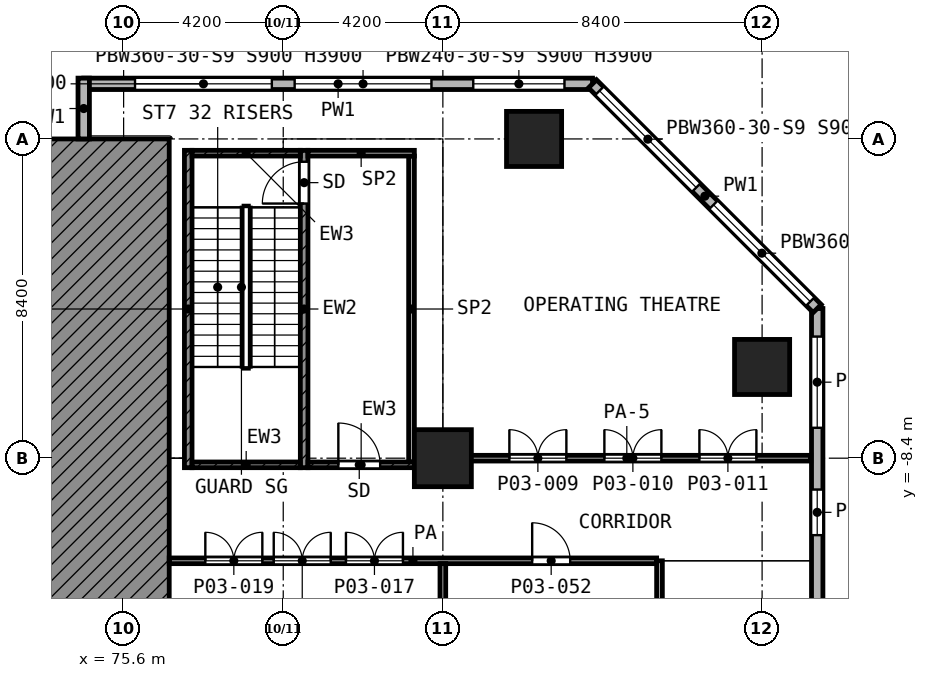
"""IFC4 building model, lengths in metres.
Left out: names, types, materials, properties, quantities, classifications, styles, units other than length and angle.
Written with IfcOpenShell. Run it as: python <this file> out.ifc"""

import sys

from ifc_helpers import new_model, si_unit, direction, frame, frame_2d, origin, origin_2d, place, context, subcontext, project, spatial, polyline, rectangle, outline, extrude, element, fill, save


model = new_model("IFC4")
c1 = context("Model", 3, precision=1e-05, world=origin(), true_north=direction((0.0, 1.0)))
c2 = subcontext(c1, "Body", "Model", "MODEL_VIEW")
j1 = project(units=[si_unit("LENGTHUNIT", "METRE"), si_unit("PLANEANGLEUNIT", "RADIAN")], contexts=[c1])
p1 = place(None, origin())
s1 = spatial("IfcSite", under=j1, at=p1, CompositionType="ELEMENT")
p2 = place(p1, origin())
s2 = spatial("IfcBuilding", under=s1, at=p2, CompositionType="ELEMENT")
p3 = place(p2, frame((0.0, 0.0, 12.6)))
s3 = spatial("IfcBuildingStorey", under=s2, at=p3, CompositionType="ELEMENT", Elevation=12.6)
for number, where, z_axis, x_axis in (
    (1, (86.4, 0.0, 0.0), (0.0, 0.0, 1.0), (1.0, 0.0, 0.0)),
    (2, (92.4, -6.0, 0.0), (0.0, 0.0, 1.0), (1.0, 0.0, 0.0)),
):
    element("IfcColumn", number, at=place(p3, frame(where, z_axis=z_axis, x_axis=x_axis)), inside=s3, PredefinedType="COLUMN", context=c2, shape_type="SweptSolid", body=[
        extrude(rectangle(XDim=1.45, YDim=1.45, at=origin_2d()), origin(), (0.0, 0.0, 1.0), 5.6),
    ])
p4 = place(p3, frame((84.0, -8.4, 0.0), z_axis=(0.0, 0.0, 1.0), x_axis=(1.0, 0.0, 0.0)))
e3 = element("IfcColumn", 3, at=p4, inside=s3, PredefinedType="COLUMN", context=c2, shape_type="SweptSolid", body=[
    extrude(rectangle(XDim=1.5, YDim=1.5, at=origin_2d()), origin(), (0.0, 0.0, 1.0), 5.6),
])
p5 = place(p3, frame((0.0, 0.0, -12.6), z_axis=(0.0, -1.0, 0.0), x_axis=(1.0, 0.0, 0.0)))
e4 = element("IfcWall", 4, at=p5, inside=s3, PredefinedType="SHEAR", context=c2, shape_type="SweptSolid", body=[
    extrude(outline(polyline([(73.952, 12.6), (73.766, 13.468), (72.986, 15.591), (71.916, 17.583), (71.462, 18.2), (76.8, 18.2), (76.8, 12.6), (73.952, 12.6)])), origin(), (0.0, 0.0, 1.0), 33.6),
])
p6 = place(p3, frame((93.85, -29.138, 0.0), z_axis=(0.0, 0.0, 1.0), x_axis=(0.0, 1.0, 0.0)))
e5 = element("IfcWall", 5, at=p6, inside=s3, PredefinedType="SOLIDWALL", context=c2, shape_type="SweptSolid", body=[
    extrude(rectangle(XDim=24.676, YDim=0.3, at=frame_2d((12.338, 0.0))), origin(), (0.0, 0.0, 1.0), 5.25),
])
p7 = place(p6, frame((0.738, 0.0, 0.9)))
e6 = element("IfcOpeningElement", 6, at=p7, cuts=e5, PredefinedType="OPENING", context=c2, shape_type="SweptSolid", body=[
    extrude(rectangle(XDim=2.4, YDim=3.0, at=frame_2d((1.2, 1.5))), frame((0.0, 0.16, 0.0), z_axis=(0.0, -1.0, 0.0), x_axis=(1.0, 0.0, 0.0)), (0.0, 0.0, 1.0), 0.32),
])
p8 = place(p6, frame((4.763, 0.0, 0.9)))
e7 = element("IfcOpeningElement", 7, at=p8, cuts=e5, PredefinedType="OPENING", context=c2, shape_type="SweptSolid", body=[
    extrude(rectangle(XDim=1.2, YDim=3.0, at=frame_2d((0.6, 1.5))), frame((0.0, 0.16, 0.0), z_axis=(0.0, -1.0, 0.0), x_axis=(1.0, 0.0, 0.0)), (0.0, 0.0, 1.0), 0.32),
])
p9 = place(p6, frame((8.438, 0.0, 0.9)))
e8 = element("IfcOpeningElement", 8, at=p9, cuts=e5, PredefinedType="OPENING", context=c2, shape_type="SweptSolid", body=[
    extrude(rectangle(XDim=3.6, YDim=3.0, at=frame_2d((1.8, 1.5))), frame((0.0, 0.16, 0.0), z_axis=(0.0, -1.0, 0.0), x_axis=(1.0, 0.0, 0.0)), (0.0, 0.0, 1.0), 0.32),
])
p10 = place(p6, frame((12.638, 0.0, 0.9)))
e9 = element("IfcOpeningElement", 9, at=p10, cuts=e5, PredefinedType="OPENING", context=c2, shape_type="SweptSolid", body=[
    extrude(rectangle(XDim=3.6, YDim=3.0, at=frame_2d((1.8, 1.5))), frame((0.0, 0.16, 0.0), z_axis=(0.0, -1.0, 0.0), x_axis=(1.0, 0.0, 0.0)), (0.0, 0.0, 1.0), 0.32),
])
p11 = place(p6, frame((18.713, 0.0, 0.9)))
e10 = element("IfcOpeningElement", 10, at=p11, cuts=e5, PredefinedType="OPENING", context=c2, shape_type="SweptSolid", body=[
    extrude(rectangle(XDim=1.2, YDim=3.0, at=frame_2d((0.6, 1.5))), frame((0.0, 0.16, 0.0), z_axis=(0.0, -1.0, 0.0), x_axis=(1.0, 0.0, 0.0)), (0.0, 0.0, 1.0), 0.32),
])
p12 = place(p6, frame((21.538, 0.0, 0.9)))
e11 = element("IfcOpeningElement", 11, at=p12, cuts=e5, PredefinedType="OPENING", context=c2, shape_type="SweptSolid", body=[
    extrude(rectangle(XDim=2.4, YDim=3.0, at=frame_2d((1.2, 1.5))), frame((0.0, 0.16, 0.0), z_axis=(0.0, -1.0, 0.0), x_axis=(1.0, 0.0, 0.0)), (0.0, 0.0, 1.0), 0.32),
])
p13 = place(p3, frame((93.85, -4.462, 0.0), z_axis=(0.0, 0.0, 1.0), x_axis=(-0.707106781187, 0.707106781187, 0.0)))
e12 = element("IfcWall", 12, at=p13, inside=s3, PredefinedType="SOLIDWALL", context=c2, shape_type="SweptSolid", body=[
    extrude(rectangle(XDim=8.361, YDim=0.3, at=frame_2d((4.181, 0.0))), origin(), (0.0, 0.0, 1.0), 5.25),
])
p14 = place(p13, frame((0.259, 0.0, 0.9)))
e13 = element("IfcOpeningElement", 13, at=p14, cuts=e12, PredefinedType="OPENING", context=c2, shape_type="SweptSolid", body=[
    extrude(rectangle(XDim=3.6, YDim=3.0, at=frame_2d((1.8, 1.5))), frame((0.0, 0.16, 0.0), z_axis=(0.0, -1.0, 0.0), x_axis=(1.0, 0.0, 0.0)), (0.0, 0.0, 1.0), 0.32),
])
p15 = place(p13, frame((4.502, 0.0, 0.9)))
e14 = element("IfcOpeningElement", 14, at=p15, cuts=e12, PredefinedType="OPENING", context=c2, shape_type="SweptSolid", body=[
    extrude(rectangle(XDim=3.6, YDim=3.0, at=frame_2d((1.8, 1.5))), frame((0.0, 0.16, 0.0), z_axis=(0.0, -1.0, 0.0), x_axis=(1.0, 0.0, 0.0)), (0.0, 0.0, 1.0), 0.32),
])
p16 = place(p3, frame((87.938, 1.45, 0.0), z_axis=(0.0, 0.0, 1.0), x_axis=(-1.0, 0.0, 0.0)))
e15 = element("IfcWall", 15, at=p16, inside=s3, PredefinedType="SOLIDWALL", context=c2, shape_type="SweptSolid", body=[
    extrude(rectangle(XDim=13.388, YDim=0.3, at=frame_2d((6.694, 0.0))), origin(), (0.0, 0.0, 1.0), 5.25),
])
p17 = place(p16, frame((0.738, 0.0, 0.9)))
e16 = element("IfcOpeningElement", 16, at=p17, cuts=e15, PredefinedType="OPENING", context=c2, shape_type="SweptSolid", body=[
    extrude(rectangle(XDim=2.4, YDim=3.0, at=frame_2d((1.2, 1.5))), frame((0.0, 0.16, 0.0), z_axis=(0.0, -1.0, 0.0), x_axis=(1.0, 0.0, 0.0)), (0.0, 0.0, 1.0), 0.32),
])
p18 = place(p16, frame((4.238, 0.0, 0.9)))
e17 = element("IfcOpeningElement", 17, at=p18, cuts=e15, PredefinedType="OPENING", context=c2, shape_type="SweptSolid", body=[
    extrude(rectangle(XDim=3.6, YDim=3.0, at=frame_2d((1.8, 1.5))), frame((0.0, 0.16, 0.0), z_axis=(0.0, -1.0, 0.0), x_axis=(1.0, 0.0, 0.0)), (0.0, 0.0, 1.0), 0.32),
])
p19 = place(p16, frame((8.438, 0.0, 0.9)))
e18 = element("IfcOpeningElement", 18, at=p19, cuts=e15, PredefinedType="OPENING", context=c2, shape_type="SweptSolid", body=[
    extrude(rectangle(XDim=3.6, YDim=3.0, at=frame_2d((1.8, 1.5))), frame((0.0, 0.16, 0.0), z_axis=(0.0, -1.0, 0.0), x_axis=(1.0, 0.0, 0.0)), (0.0, 0.0, 1.0), 0.32),
])
p20 = place(p3, frame((74.55, 1.6, 0.0), z_axis=(0.0, 0.0, 1.0), x_axis=(0.0, -1.0, 0.0)))
e19 = element("IfcWall", 19, at=p20, inside=s3, PredefinedType="SOLIDWALL", context=c2, shape_type="SweptSolid", body=[
    extrude(rectangle(XDim=1.6, YDim=0.3, at=frame_2d((0.8, 0.0))), origin(), (0.0, 0.0, 1.0), 5.25),
])
p21 = place(p3, frame((77.3, -8.65, 0.0), z_axis=(0.0, 0.0, 1.0), x_axis=(0.0, 1.0, 0.0)))
e20 = element("IfcWall", 20, at=p21, inside=s3, PredefinedType="SHEAR", context=c2, shape_type="SweptSolid", body=[
    extrude(rectangle(XDim=8.35, YDim=0.2, at=frame_2d((4.175, 0.0))), origin(), (0.0, 0.0, 1.0), 5.25),
])
p22 = place(p3, frame((80.35, -8.65, 0.0), z_axis=(0.0, 0.0, 1.0), x_axis=(0.0, 1.0, 0.0)))
e21 = element("IfcWall", 21, at=p22, inside=s3, PredefinedType="SHEAR", context=c2, shape_type="SweptSolid", body=[
    extrude(rectangle(XDim=8.35, YDim=0.2, at=frame_2d((4.175, 0.0))), origin(), (0.0, 0.0, 1.0), 5.25),
])
p23 = place(p22, frame((6.95, 0.0, 0.0)))
e22 = element("IfcOpeningElement", 22, at=p23, cuts=e21, PredefinedType="OPENING", context=c2, shape_type="SweptSolid", body=[
    extrude(rectangle(XDim=1.1, YDim=2.1, at=frame_2d((0.55, 1.05))), frame((0.0, 0.11, 0.0), z_axis=(0.0, -1.0, 0.0), x_axis=(1.0, 0.0, 0.0)), (0.0, 0.0, 1.0), 0.22),
])
p24 = place(p3, frame((77.4, -0.375, 0.0), z_axis=(0.0, 0.0, 1.0), x_axis=(1.0, 0.0, 0.0)))
e23 = element("IfcWall", 23, at=p24, inside=s3, PredefinedType="SHEAR", context=c2, shape_type="SweptSolid", body=[
    extrude(rectangle(XDim=2.85, YDim=0.15, at=frame_2d((1.425, 0.0))), origin(), (0.0, 0.0, 1.0), 5.25),
])
p25 = place(p3, frame((80.45, -0.375, 0.0), z_axis=(0.0, 0.0, 1.0), x_axis=(1.0, 0.0, 0.0)))
e24 = element("IfcWall", 24, at=p25, inside=s3, PredefinedType="PARTITIONING", context=c2, shape_type="SweptSolid", body=[
    extrude(rectangle(XDim=2.8, YDim=0.15, at=frame_2d((1.4, 0.0))), origin(), (0.0, 0.0, 1.0), 5.25),
])
p26 = place(p3, frame((77.4, -8.575, 0.0), z_axis=(0.0, 0.0, 1.0), x_axis=(1.0, 0.0, 0.0)))
e25 = element("IfcWall", 25, at=p26, inside=s3, PredefinedType="SHEAR", context=c2, shape_type="SweptSolid", body=[
    extrude(rectangle(XDim=2.85, YDim=0.15, at=frame_2d((1.425, 0.0))), origin(), (0.0, 0.0, 1.0), 5.25),
])
p27 = place(p3, frame((80.45, -8.575, 0.0), z_axis=(0.0, 0.0, 1.0), x_axis=(1.0, 0.0, 0.0)))
e26 = element("IfcWall", 26, at=p27, inside=s3, PredefinedType="SHEAR", context=c2, shape_type="SweptSolid", body=[
    extrude(rectangle(XDim=2.8, YDim=0.15, at=frame_2d((1.4, 0.0))), origin(), (0.0, 0.0, 1.0), 5.25),
])
p28 = place(p27, frame((0.8, 0.0, 0.0)))
e27 = element("IfcOpeningElement", 27, at=p28, cuts=e26, PredefinedType="OPENING", context=c2, shape_type="SweptSolid", body=[
    extrude(rectangle(XDim=1.1, YDim=2.1, at=frame_2d((0.55, 1.05))), frame((0.0, 0.085, 0.0), z_axis=(0.0, -1.0, 0.0), x_axis=(1.0, 0.0, 0.0)), (0.0, 0.0, 1.0), 0.17),
])
p29 = place(p3, frame((83.175, -8.5, 0.0), z_axis=(0.0, 0.0, 1.0), x_axis=(0.0, 1.0, 0.0)))
e28 = element("IfcWall", 28, at=p29, inside=s3, PredefinedType="PARTITIONING", context=c2, shape_type="SweptSolid", body=[
    extrude(rectangle(XDim=8.05, YDim=0.15, at=frame_2d((4.025, 0.0))), origin(), (0.0, 0.0, 1.0), 5.25),
])
p30 = place(p3, frame((76.8, -11.1, 0.0), z_axis=(0.0, 0.0, 1.0), x_axis=(1.0, 0.0, 0.0)))
e29 = element("IfcWall", 29, at=p30, inside=s3, PredefinedType="PARTITIONING", context=c2, shape_type="SweptSolid", body=[
    extrude(rectangle(XDim=12.825, YDim=0.15, at=frame_2d((6.413, 0.0))), origin(), (0.0, 0.0, 1.0), 5.25),
])
p31 = place(p30, frame((4.65, 0.0, 0.0)))
e30 = element("IfcOpeningElement", 30, at=p31, cuts=e29, PredefinedType="OPENING", context=c2, shape_type="SweptSolid", body=[
    extrude(rectangle(XDim=1.5, YDim=2.1, at=frame_2d((0.75, 1.05))), frame((0.0, 0.085, 0.0), z_axis=(0.0, -1.0, 0.0), x_axis=(1.0, 0.0, 0.0)), (0.0, 0.0, 1.0), 0.17),
])
p32 = place(p30, frame((2.75, 0.0, 0.0)))
e31 = element("IfcOpeningElement", 31, at=p32, cuts=e29, PredefinedType="OPENING", context=c2, shape_type="SweptSolid", body=[
    extrude(rectangle(XDim=1.5, YDim=2.1, at=frame_2d((0.75, 1.05))), frame((0.0, 0.085, 0.0), z_axis=(0.0, -1.0, 0.0), x_axis=(1.0, 0.0, 0.0)), (0.0, 0.0, 1.0), 0.17),
])
p33 = place(p30, frame((0.95, 0.0, 0.0)))
e32 = element("IfcOpeningElement", 32, at=p33, cuts=e29, PredefinedType="OPENING", context=c2, shape_type="SweptSolid", body=[
    extrude(rectangle(XDim=1.5, YDim=2.1, at=frame_2d((0.75, 1.05))), frame((0.0, 0.085, 0.0), z_axis=(0.0, -1.0, 0.0), x_axis=(1.0, 0.0, 0.0)), (0.0, 0.0, 1.0), 0.17),
])
p34 = place(p30, frame((9.55, 0.0, 0.0)))
e33 = element("IfcOpeningElement", 33, at=p34, cuts=e29, PredefinedType="OPENING", context=c2, shape_type="SweptSolid", body=[
    extrude(rectangle(XDim=1.0, YDim=2.1, at=frame_2d((0.5, 1.05))), frame((0.0, 0.085, 0.0), z_axis=(0.0, -1.0, 0.0), x_axis=(1.0, 0.0, 0.0)), (0.0, 0.0, 1.0), 0.17),
])
e34 = element("IfcWall", 34, at=p4, inside=s3, PredefinedType="PARTITIONING", context=c2, shape_type="SweptSolid", body=[
    extrude(rectangle(XDim=9.68, YDim=0.15, at=frame_2d((4.84, 0.0))), origin(), (0.0, 0.0, 1.0), 3.85),
])
p35 = place(p4, frame((1.75, 0.0, 0.0)))
e35 = element("IfcOpeningElement", 35, at=p35, cuts=e34, PredefinedType="OPENING", context=c2, shape_type="SweptSolid", body=[
    extrude(rectangle(XDim=1.5, YDim=2.1, at=frame_2d((0.75, 1.05))), frame((0.0, 0.085, 0.0), z_axis=(0.0, -1.0, 0.0), x_axis=(1.0, 0.0, 0.0)), (0.0, 0.0, 1.0), 0.17),
])
p36 = place(p4, frame((4.25, 0.0, 0.0)))
e36 = element("IfcOpeningElement", 36, at=p36, cuts=e34, PredefinedType="OPENING", context=c2, shape_type="SweptSolid", body=[
    extrude(rectangle(XDim=1.5, YDim=2.1, at=frame_2d((0.75, 1.05))), frame((0.0, 0.085, 0.0), z_axis=(0.0, -1.0, 0.0), x_axis=(1.0, 0.0, 0.0)), (0.0, 0.0, 1.0), 0.17),
])
p37 = place(p4, frame((6.75, 0.0, 0.0)))
e37 = element("IfcOpeningElement", 37, at=p37, cuts=e34, PredefinedType="OPENING", context=c2, shape_type="SweptSolid", body=[
    extrude(rectangle(XDim=1.5, YDim=2.1, at=frame_2d((0.75, 1.05))), frame((0.0, 0.085, 0.0), z_axis=(0.0, -1.0, 0.0), x_axis=(1.0, 0.0, 0.0)), (0.0, 0.0, 1.0), 0.17),
])
p38 = place(p3, frame((84.0, -22.425, 0.0), z_axis=(0.0, 0.0, 1.0), x_axis=(0.0, 1.0, 0.0)))
e38 = element("IfcWall", 38, at=p38, inside=s3, PredefinedType="PARTITIONING", context=c2, shape_type="SweptSolid", body=[
    extrude(rectangle(XDim=11.25, YDim=0.15, at=frame_2d((5.625, 0.0))), origin(), (0.0, 0.0, 1.0), 5.25),
])
p39 = place(p3, frame((89.7, -22.5, 0.0), z_axis=(0.0, 0.0, 1.0), x_axis=(0.0, 1.0, 0.0)))
e39 = element("IfcWall", 39, at=p39, inside=s3, PredefinedType="PARTITIONING", context=c2, shape_type="SweptSolid", body=[
    extrude(rectangle(XDim=11.4, YDim=0.15, at=frame_2d((5.7, 0.0))), origin(), (0.0, 0.0, 1.0), 5.25),
])
p40 = place(p11, origin())
e40 = element("IfcWindow", 40, at=p40, inside=s3, PartitioningType="SINGLE_PANEL", PredefinedType="WINDOW", context=c2, shape_type="SweptSolid", body=[
    extrude(rectangle(XDim=1.2, YDim=3.0, at=frame_2d((0.6, 1.5))), frame((0.0, 0.03, 0.0), z_axis=(0.0, -1.0, 0.0), x_axis=(1.0, 0.0, 0.0)), (0.0, 0.0, 1.0), 0.06),
])
fill(e10, e40)
p41 = place(p12, origin())
e41 = element("IfcWindow", 41, at=p41, inside=s3, PartitioningType="SINGLE_PANEL", PredefinedType="WINDOW", context=c2, shape_type="SweptSolid", body=[
    extrude(rectangle(XDim=2.4, YDim=3.0, at=frame_2d((1.2, 1.5))), frame((0.0, 0.03, 0.0), z_axis=(0.0, -1.0, 0.0), x_axis=(1.0, 0.0, 0.0)), (0.0, 0.0, 1.0), 0.06),
])
fill(e11, e41)
p42 = place(p14, origin())
e42 = element("IfcWindow", 42, at=p42, inside=s3, PartitioningType="SINGLE_PANEL", PredefinedType="WINDOW", context=c2, shape_type="SweptSolid", body=[
    extrude(rectangle(XDim=3.6, YDim=3.0, at=frame_2d((1.8, 1.5))), frame((0.0, 0.03, 0.0), z_axis=(0.0, -1.0, 0.0), x_axis=(1.0, 0.0, 0.0)), (0.0, 0.0, 1.0), 0.06),
])
fill(e13, e42)
p43 = place(p15, origin())
e43 = element("IfcWindow", 43, at=p43, inside=s3, PartitioningType="SINGLE_PANEL", PredefinedType="WINDOW", context=c2, shape_type="SweptSolid", body=[
    extrude(rectangle(XDim=3.6, YDim=3.0, at=frame_2d((1.8, 1.5))), frame((0.0, 0.03, 0.0), z_axis=(0.0, -1.0, 0.0), x_axis=(1.0, 0.0, 0.0)), (0.0, 0.0, 1.0), 0.06),
])
fill(e14, e43)
p44 = place(p17, origin())
e44 = element("IfcWindow", 44, at=p44, inside=s3, PartitioningType="SINGLE_PANEL", PredefinedType="WINDOW", context=c2, shape_type="SweptSolid", body=[
    extrude(rectangle(XDim=2.4, YDim=3.0, at=frame_2d((1.2, 1.5))), frame((0.0, 0.03, 0.0), z_axis=(0.0, -1.0, 0.0), x_axis=(1.0, 0.0, 0.0)), (0.0, 0.0, 1.0), 0.06),
])
fill(e16, e44)
p45 = place(p18, origin())
e45 = element("IfcWindow", 45, at=p45, inside=s3, PartitioningType="SINGLE_PANEL", PredefinedType="WINDOW", context=c2, shape_type="SweptSolid", body=[
    extrude(rectangle(XDim=3.6, YDim=3.0, at=frame_2d((1.8, 1.5))), frame((0.0, 0.03, 0.0), z_axis=(0.0, -1.0, 0.0), x_axis=(1.0, 0.0, 0.0)), (0.0, 0.0, 1.0), 0.06),
])
fill(e17, e45)
p46 = place(p19, origin())
e46 = element("IfcWindow", 46, at=p46, inside=s3, PartitioningType="SINGLE_PANEL", PredefinedType="WINDOW", context=c2, shape_type="SweptSolid", body=[
    extrude(rectangle(XDim=3.6, YDim=3.0, at=frame_2d((1.8, 1.5))), frame((0.0, 0.03, 0.0), z_axis=(0.0, -1.0, 0.0), x_axis=(1.0, 0.0, 0.0)), (0.0, 0.0, 1.0), 0.06),
])
fill(e18, e46)
p47 = place(p23, origin())
e47 = element("IfcDoor", 47, at=p47, inside=s3, OperationType="SINGLE_SWING_LEFT", PredefinedType="DOOR", context=c2, shape_type="SweptSolid", body=[
    extrude(rectangle(XDim=1.1, YDim=2.1, at=frame_2d((0.55, 1.05))), frame((0.0, 0.025, 0.0), z_axis=(0.0, -1.0, 0.0), x_axis=(1.0, 0.0, 0.0)), (0.0, 0.0, 1.0), 0.05),
])
fill(e22, e47)
p48 = place(p28, origin())
e48 = element("IfcDoor", 48, at=p48, inside=s3, OperationType="SINGLE_SWING_LEFT", PredefinedType="DOOR", context=c2, shape_type="SweptSolid", body=[
    extrude(rectangle(XDim=1.1, YDim=2.1, at=frame_2d((0.55, 1.05))), frame((0.0, 0.025, 0.0), z_axis=(0.0, -1.0, 0.0), x_axis=(1.0, 0.0, 0.0)), (0.0, 0.0, 1.0), 0.05),
])
fill(e27, e48)
p49 = place(p35, origin())
e49 = element("IfcDoor", 49, at=p49, inside=s3, OperationType="DOUBLE_DOOR_SINGLE_SWING", PredefinedType="DOOR", context=c2, shape_type="SweptSolid", body=[
    extrude(rectangle(XDim=1.5, YDim=2.1, at=frame_2d((0.75, 1.05))), frame((0.0, 0.025, 0.0), z_axis=(0.0, -1.0, 0.0), x_axis=(1.0, 0.0, 0.0)), (0.0, 0.0, 1.0), 0.05),
])
fill(e35, e49)
p50 = place(p36, origin())
e50 = element("IfcDoor", 50, at=p50, inside=s3, OperationType="DOUBLE_DOOR_SINGLE_SWING", PredefinedType="DOOR", context=c2, shape_type="SweptSolid", body=[
    extrude(rectangle(XDim=1.5, YDim=2.1, at=frame_2d((0.75, 1.05))), frame((0.0, 0.025, 0.0), z_axis=(0.0, -1.0, 0.0), x_axis=(1.0, 0.0, 0.0)), (0.0, 0.0, 1.0), 0.05),
])
fill(e36, e50)
p51 = place(p37, origin())
e51 = element("IfcDoor", 51, at=p51, inside=s3, OperationType="DOUBLE_DOOR_SINGLE_SWING", PredefinedType="DOOR", context=c2, shape_type="SweptSolid", body=[
    extrude(rectangle(XDim=1.5, YDim=2.1, at=frame_2d((0.75, 1.05))), frame((0.0, 0.025, 0.0), z_axis=(0.0, -1.0, 0.0), x_axis=(1.0, 0.0, 0.0)), (0.0, 0.0, 1.0), 0.05),
])
fill(e37, e51)
p52 = place(p31, origin())
e52 = element("IfcDoor", 52, at=p52, inside=s3, OperationType="DOUBLE_DOOR_SINGLE_SWING", PredefinedType="DOOR", context=c2, shape_type="SweptSolid", body=[
    extrude(rectangle(XDim=1.5, YDim=2.1, at=frame_2d((0.75, 1.05))), frame((0.0, 0.025, 0.0), z_axis=(0.0, -1.0, 0.0), x_axis=(1.0, 0.0, 0.0)), (0.0, 0.0, 1.0), 0.05),
])
fill(e30, e52)
p53 = place(p32, origin())
e53 = element("IfcDoor", 53, at=p53, inside=s3, OperationType="DOUBLE_DOOR_SINGLE_SWING", PredefinedType="DOOR", context=c2, shape_type="SweptSolid", body=[
    extrude(rectangle(XDim=1.5, YDim=2.1, at=frame_2d((0.75, 1.05))), frame((0.0, 0.025, 0.0), z_axis=(0.0, -1.0, 0.0), x_axis=(1.0, 0.0, 0.0)), (0.0, 0.0, 1.0), 0.05),
])
fill(e31, e53)
p54 = place(p33, origin())
e54 = element("IfcDoor", 54, at=p54, inside=s3, OperationType="DOUBLE_DOOR_SINGLE_SWING", PredefinedType="DOOR", context=c2, shape_type="SweptSolid", body=[
    extrude(rectangle(XDim=1.5, YDim=2.1, at=frame_2d((0.75, 1.05))), frame((0.0, 0.025, 0.0), z_axis=(0.0, -1.0, 0.0), x_axis=(1.0, 0.0, 0.0)), (0.0, 0.0, 1.0), 0.05),
])
fill(e32, e54)
p55 = place(p34, origin())
e55 = element("IfcDoor", 55, at=p55, inside=s3, OperationType="SINGLE_SWING_LEFT", PredefinedType="DOOR", context=c2, shape_type="SweptSolid", body=[
    extrude(rectangle(XDim=1.0, YDim=2.1, at=frame_2d((0.5, 1.05))), frame((0.0, 0.025, 0.0), z_axis=(0.0, -1.0, 0.0), x_axis=(1.0, 0.0, 0.0)), (0.0, 0.0, 1.0), 0.05),
])
fill(e33, e55)
save(model, sys.argv[1])
